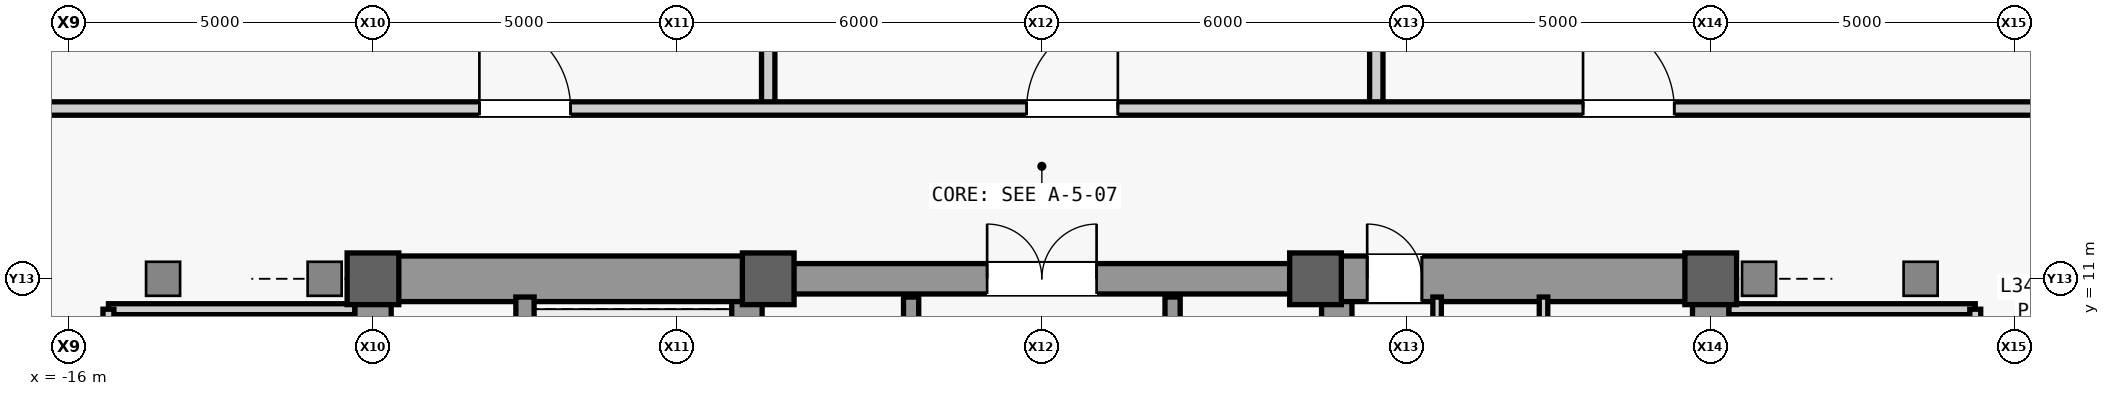
"""IFC4 building model, lengths in metres.
Left out: names, types, materials, properties, quantities, classifications, styles, units other than length and angle.
Written with IfcOpenShell. Run it as: python <this file> out.ifc"""

import sys

from ifc_helpers import new_model, si_unit, direction, frame, frame_2d, origin, origin_2d, place, context, subcontext, project, spatial, rectangle, extrude, source, transform, mapped, element, fill, save


model = new_model("IFC4")
c1 = context("Model", 3, precision=1e-05, world=origin(), true_north=direction((0.0, 1.0)))
c2 = subcontext(c1, "Body", "Model", "MODEL_VIEW")
j1 = project(units=[si_unit("LENGTHUNIT", "METRE"), si_unit("PLANEANGLEUNIT", "RADIAN")], contexts=[c1])
p1 = place(None, origin())
s1 = spatial("IfcSite", under=j1, at=p1, CompositionType="ELEMENT")
p2 = place(p1, origin())
s2 = spatial("IfcBuilding", under=s1, at=p2, CompositionType="ELEMENT")
p3 = place(p2, frame((0.0, 0.0, 149.9)))
s3 = spatial("IfcBuildingStorey", under=s2, at=p3, CompositionType="ELEMENT", Elevation=149.9)
m1 = source(origin(), c2, "Body", "SweptSolid", [
    extrude(rectangle(XDim=22.0, YDim=0.6, at=frame_2d((11.0, 0.0))), origin(), (0.0, 0.0, 1.0), 4.98),
])
p4 = place(p3, frame((-11.0, -11.0, 0.0), z_axis=(0.0, 0.0, 1.0), x_axis=(0.0, 1.0, 0.0)))
e1 = element("IfcWall", 1, at=p4, inside=s3, PredefinedType="SHEAR", context=c2, shape_type="MappedRepresentation", body=[
    mapped(m1, transform((0.0, 0.0, 0.0), scale=1.0)),
])
m2 = source(origin(), c2, "Body", "SweptSolid", [
    extrude(rectangle(XDim=1.1, YDim=2.2, at=frame_2d((0.55, 1.1))), frame((0.0, 0.31, 0.0), z_axis=(0.0, -1.0, 0.0), x_axis=(1.0, 0.0, 0.0)), (0.0, 0.0, 1.0), 0.62),
])
p5 = place(p4, frame((0.8, 0.0, 0.0)))
e2 = element("IfcOpeningElement", 2, at=p5, cuts=e1, PredefinedType="OPENING", context=c2, shape_type="MappedRepresentation", body=[
    mapped(m2, transform((0.0, 0.0, 0.0), scale=1.0)),
])
p6 = place(p4, frame((12.5, 0.0, 0.0)))
e3 = element("IfcOpeningElement", 3, at=p6, cuts=e1, PredefinedType="OPENING", context=c2, shape_type="MappedRepresentation", body=[
    mapped(m2, transform((0.0, 0.0, 0.0), scale=1.0)),
])
m3 = source(origin(), c2, "Body", "SweptSolid", [
    extrude(rectangle(XDim=0.9, YDim=2.15, at=frame_2d((0.45, 1.075))), frame((0.0, 0.31, 0.0), z_axis=(0.0, -1.0, 0.0), x_axis=(1.0, 0.0, 0.0)), (0.0, 0.0, 1.0), 0.62),
])
p7 = place(p4, frame((7.575, 0.0, 0.0)))
e4 = element("IfcOpeningElement", 4, at=p7, cuts=e1, PredefinedType="OPENING", context=c2, shape_type="MappedRepresentation", body=[
    mapped(m3, transform((0.0, 0.0, 0.0), scale=1.0)),
])
m4 = source(origin(), c2, "Body", "SweptSolid", [
    extrude(rectangle(XDim=1.3, YDim=2.3, at=frame_2d((0.65, 1.15))), frame((0.0, 0.31, 0.0), z_axis=(0.0, -1.0, 0.0), x_axis=(1.0, 0.0, 0.0)), (0.0, 0.0, 1.0), 0.62),
])
p8 = place(p4, frame((2.7, 0.0, 0.0)))
e5 = element("IfcOpeningElement", 5, at=p8, cuts=e1, PredefinedType="OPENING", context=c2, shape_type="MappedRepresentation", body=[
    mapped(m4, transform((0.0, 0.0, 0.0), scale=1.0)),
])
p9 = place(p3, frame((11.0, -11.0, 0.0), z_axis=(0.0, 0.0, 1.0), x_axis=(0.0, 1.0, 0.0)))
e6 = element("IfcWall", 6, at=p9, inside=s3, PredefinedType="SHEAR", context=c2, shape_type="MappedRepresentation", body=[
    mapped(m1, transform((0.0, 0.0, 0.0), scale=1.0)),
])
p10 = place(p9, frame((0.8, 0.0, 0.0)))
e7 = element("IfcOpeningElement", 7, at=p10, cuts=e6, PredefinedType="OPENING", context=c2, shape_type="MappedRepresentation", body=[
    mapped(m2, transform((0.0, 0.0, 0.0), scale=1.0)),
])
p11 = place(p9, frame((7.575, 0.0, 0.0)))
e8 = element("IfcOpeningElement", 8, at=p11, cuts=e6, PredefinedType="OPENING", context=c2, shape_type="MappedRepresentation", body=[
    mapped(m3, transform((0.0, 0.0, 0.0), scale=1.0)),
])
p12 = place(p9, frame((2.7, 0.0, 0.0)))
e9 = element("IfcOpeningElement", 9, at=p12, cuts=e6, PredefinedType="OPENING", context=c2, shape_type="MappedRepresentation", body=[
    mapped(m4, transform((0.0, 0.0, 0.0), scale=1.0)),
])
p13 = place(p9, frame((13.35, 0.0, 0.0)))
e10 = element("IfcOpeningElement", 10, at=p13, cuts=e6, PredefinedType="OPENING", context=c2, shape_type="MappedRepresentation", body=[
    mapped(m4, transform((0.0, 0.0, 0.0), scale=1.0)),
])
m5 = source(origin(), c2, "Body", "SweptSolid", [
    extrude(rectangle(XDim=21.4, YDim=0.5, at=frame_2d((10.7, 0.0))), origin(), (0.0, 0.0, 1.0), 4.98),
])
for number, where, z_axis, x_axis in (
    (11, (-4.85, -10.7, 0.0), (0.0, 0.0, 1.0), (0.0, 1.0, 0.0)),
    (12, (4.85, -10.7, 0.0), (0.0, 0.0, 1.0), (0.0, 1.0, 0.0)),
):
    element("IfcWall", number, at=place(p3, frame(where, z_axis=z_axis, x_axis=x_axis)), inside=s3, PredefinedType="SHEAR", context=c2, shape_type="MappedRepresentation", body=[
        mapped(m5, transform((0.0, 0.0, 0.0), scale=1.0)),
    ])
m6 = source(origin(), c2, "Body", "SweptSolid", [
    extrude(rectangle(XDim=5.85, YDim=0.75, at=frame_2d((2.925, 0.0))), origin(), (0.0, 0.0, 1.0), 4.98),
])
p14 = place(p3, frame((-10.7, 11.0, 0.0), z_axis=(0.0, 0.0, 1.0), x_axis=(1.0, 0.0, 0.0)))
e13 = element("IfcWall", 13, at=p14, inside=s3, PredefinedType="SHEAR", context=c2, shape_type="MappedRepresentation", body=[
    mapped(m6, transform((0.0, 0.0, 0.0), scale=1.0)),
])
p15 = place(p3, frame((4.85, 11.0, 0.0), z_axis=(0.0, 0.0, 1.0), x_axis=(1.0, 0.0, 0.0)))
e14 = element("IfcWall", 14, at=p15, inside=s3, PredefinedType="SHEAR", context=c2, shape_type="MappedRepresentation", body=[
    mapped(m6, transform((0.0, 0.0, 0.0), scale=1.0)),
])
m7 = source(origin(), c2, "Body", "SweptSolid", [
    extrude(rectangle(XDim=0.9, YDim=2.15, at=frame_2d((0.45, 1.075))), frame((0.0, 0.385, 0.0), z_axis=(0.0, -1.0, 0.0), x_axis=(1.0, 0.0, 0.0)), (0.0, 0.0, 1.0), 0.77),
])
p16 = place(p15, frame((0.5, 0.0, 0.0)))
e15 = element("IfcOpeningElement", 15, at=p16, cuts=e14, PredefinedType="OPENING", context=c2, shape_type="MappedRepresentation", body=[
    mapped(m7, transform((0.0, 0.0, 0.0), scale=1.0)),
])
m8 = source(origin(), c2, "Body", "SweptSolid", [
    extrude(rectangle(XDim=9.2, YDim=0.5, at=frame_2d((4.6, 0.0))), origin(), (0.0, 0.0, 1.0), 4.98),
])
p17 = place(p3, frame((-4.6, 11.0, 0.0), z_axis=(0.0, 0.0, 1.0), x_axis=(1.0, 0.0, 0.0)))
e16 = element("IfcWall", 16, at=p17, inside=s3, PredefinedType="SHEAR", context=c2, shape_type="MappedRepresentation", body=[
    mapped(m8, transform((0.0, 0.0, 0.0), scale=1.0)),
])
m9 = source(origin(), c2, "Body", "SweptSolid", [
    extrude(rectangle(XDim=1.8, YDim=2.25, at=frame_2d((0.9, 1.125))), frame((0.0, 0.26, 0.0), z_axis=(0.0, -1.0, 0.0), x_axis=(1.0, 0.0, 0.0)), (0.0, 0.0, 1.0), 0.52),
])
p18 = place(p17, frame((3.7, 0.0, 0.0)))
e17 = element("IfcOpeningElement", 17, at=p18, cuts=e16, PredefinedType="OPENING", context=c2, shape_type="MappedRepresentation", body=[
    mapped(m9, transform((0.0, 0.0, 0.0), scale=1.0)),
])
m10 = source(origin(), c2, "Body", "SweptSolid", [
    extrude(rectangle(XDim=0.85, YDim=0.85, at=origin_2d()), origin(), (0.0, 0.0, 1.0), 5.2),
])
for number, where, z_axis, x_axis in (
    (18, (-11.0, 11.0, 0.0), (0.0, 0.0, 1.0), (1.0, 0.0, 0.0)),
    (19, (-4.5, 11.0, 0.0), (0.0, 0.0, 1.0), (1.0, 0.0, 0.0)),
    (20, (4.5, 11.0, 0.0), (0.0, 0.0, 1.0), (1.0, 0.0, 0.0)),
    (21, (11.0, 11.0, 0.0), (0.0, 0.0, 1.0), (1.0, 0.0, 0.0)),
):
    element("IfcColumn", number, at=place(p3, frame(where, z_axis=z_axis, x_axis=x_axis)), inside=s3, PredefinedType="COLUMN", context=c2, shape_type="MappedRepresentation", body=[
        mapped(m10, transform((0.0, 0.0, 0.0), scale=1.0)),
    ])
m11 = source(origin(), c2, "Body", "SweptSolid", [
    extrude(rectangle(XDim=7.75, YDim=0.3, at=frame_2d((3.875, 0.0))), origin(), (0.0, 0.0, 1.0), 4.98),
])
p19 = place(p3, frame((-8.5, 2.95, 0.0), z_axis=(0.0, 0.0, 1.0), x_axis=(0.0, 1.0, 0.0)))
e22 = element("IfcWall", 22, at=p19, inside=s3, PredefinedType="SHEAR", context=c2, shape_type="MappedRepresentation", body=[
    mapped(m11, transform((0.0, 0.0, 0.0), scale=1.0)),
])
m12 = source(origin(), c2, "Body", "SweptSolid", [
    extrude(rectangle(XDim=9.4, YDim=0.14, at=frame_2d((4.7, 0.0))), origin(), (0.0, 0.0, 1.0), 4.98),
])
p20 = place(p3, frame((8.25, 1.3, 0.0), z_axis=(0.0, 0.0, 1.0), x_axis=(0.0, 1.0, 0.0)))
e23 = element("IfcWall", 23, at=p20, inside=s3, PredefinedType="PARTITIONING", context=c2, shape_type="MappedRepresentation", body=[
    mapped(m12, transform((0.0, 0.0, 0.0), scale=1.0)),
])
m13 = source(origin(), c2, "Body", "SweptSolid", [
    extrude(rectangle(XDim=5.7, YDim=0.14, at=frame_2d((2.85, 0.0))), origin(), (0.0, 0.0, 1.0), 4.98),
])
p21 = place(p3, frame((6.5, 5.0, 0.0), z_axis=(0.0, 0.0, 1.0), x_axis=(0.0, 1.0, 0.0)))
e24 = element("IfcWall", 24, at=p21, inside=s3, PredefinedType="PARTITIONING", context=c2, shape_type="MappedRepresentation", body=[
    mapped(m13, transform((0.0, 0.0, 0.0), scale=1.0)),
])
m14 = source(origin(), c2, "Body", "SweptSolid", [
    extrude(rectangle(XDim=0.9, YDim=2.15, at=frame_2d((0.45, 1.075))), frame((0.0, 0.08, 0.0), z_axis=(0.0, -1.0, 0.0), x_axis=(1.0, 0.0, 0.0)), (0.0, 0.0, 1.0), 0.16),
])
p22 = place(p21, frame((2.05, 0.0, 0.0)))
e25 = element("IfcOpeningElement", 25, at=p22, cuts=e24, PredefinedType="OPENING", context=c2, shape_type="MappedRepresentation", body=[
    mapped(m14, transform((0.0, 0.0, 0.0), scale=1.0)),
])
m15 = source(origin(), c2, "Body", "SweptSolid", [
    extrude(rectangle(XDim=4.05, YDim=0.18, at=frame_2d((2.025, 0.0))), origin(), (0.0, 0.0, 1.0), 4.98),
])
p23 = place(p3, frame((-15.35, 10.5, 0.0), z_axis=(0.0, 0.0, 1.0), x_axis=(1.0, 0.0, 0.0)))
e26 = element("IfcWall", 26, at=p23, inside=s3, PredefinedType="PARTITIONING", context=c2, shape_type="MappedRepresentation", body=[
    mapped(m15, transform((0.0, 0.0, 0.0), scale=1.0)),
])
m16 = source(origin(), c2, "Body", "SweptSolid", [
    extrude(rectangle(XDim=16.6, YDim=0.18, at=frame_2d((8.3, 0.0))), origin(), (0.0, 0.0, 1.0), 4.98),
])
p24 = place(p3, frame((-15.35, -6.1, 0.0), z_axis=(0.0, 0.0, 1.0), x_axis=(0.0, 1.0, 0.0)))
e27 = element("IfcWall", 27, at=p24, inside=s3, PredefinedType="PARTITIONING", context=c2, shape_type="MappedRepresentation", body=[
    mapped(m16, transform((0.0, 0.0, 0.0), scale=1.0)),
])
m17 = source(origin(), c2, "Body", "SweptSolid", [
    extrude(rectangle(XDim=1.8, YDim=2.25, at=frame_2d((0.9, 1.125))), frame((0.0, 0.1, 0.0), z_axis=(0.0, -1.0, 0.0), x_axis=(1.0, 0.0, 0.0)), (0.0, 0.0, 1.0), 0.2),
])
p25 = place(p24, frame((2.7, 0.0, 0.0)))
e28 = element("IfcOpeningElement", 28, at=p25, cuts=e27, PredefinedType="OPENING", context=c2, shape_type="MappedRepresentation", body=[
    mapped(m17, transform((0.0, 0.0, 0.0), scale=1.0)),
])
p26 = place(p24, frame((11.0, 0.0, 0.0)))
e29 = element("IfcOpeningElement", 29, at=p26, cuts=e27, PredefinedType="OPENING", context=c2, shape_type="MappedRepresentation", body=[
    mapped(m17, transform((0.0, 0.0, 0.0), scale=1.0)),
])
p27 = place(p3, frame((11.3, 10.5, 0.0), z_axis=(0.0, 0.0, 1.0), x_axis=(1.0, 0.0, 0.0)))
e30 = element("IfcWall", 30, at=p27, inside=s3, PredefinedType="PARTITIONING", context=c2, shape_type="MappedRepresentation", body=[
    mapped(m15, transform((0.0, 0.0, 0.0), scale=1.0)),
])
p28 = place(p3, frame((15.35, -6.1, 0.0), z_axis=(0.0, 0.0, 1.0), x_axis=(0.0, 1.0, 0.0)))
e31 = element("IfcWall", 31, at=p28, inside=s3, PredefinedType="PARTITIONING", context=c2, shape_type="MappedRepresentation", body=[
    mapped(m16, transform((0.0, 0.0, 0.0), scale=1.0)),
])
p29 = place(p28, frame((2.7, 0.0, 0.0)))
e32 = element("IfcOpeningElement", 32, at=p29, cuts=e31, PredefinedType="OPENING", context=c2, shape_type="MappedRepresentation", body=[
    mapped(m17, transform((0.0, 0.0, 0.0), scale=1.0)),
])
p30 = place(p28, frame((13.0, 0.0, 0.0)))
e33 = element("IfcOpeningElement", 33, at=p30, cuts=e31, PredefinedType="OPENING", context=c2, shape_type="MappedRepresentation", body=[
    mapped(m17, transform((0.0, 0.0, 0.0), scale=1.0)),
])
m18 = source(origin(), c2, "Body", "SweptSolid", [
    extrude(rectangle(XDim=5.4, YDim=0.25, at=frame_2d((2.7, 0.0))), origin(), (0.0, 0.0, 1.0), 4.98),
])
for number, where, z_axis, x_axis in (
    (34, (-2.15, 5.3, 0.0), (0.0, 0.0, 1.0), (0.0, 1.0, 0.0)),
    (35, (2.15, 5.3, 0.0), (0.0, 0.0, 1.0), (0.0, 1.0, 0.0)),
):
    element("IfcWall", number, at=place(p3, frame(where, z_axis=z_axis, x_axis=x_axis)), inside=s3, PredefinedType="SHEAR", context=c2, shape_type="MappedRepresentation", body=[
        mapped(m18, transform((0.0, 0.0, 0.0), scale=1.0)),
    ])
m19 = source(origin(), c2, "Body", "SweptSolid", [
    extrude(rectangle(XDim=16.2, YDim=0.22, at=frame_2d((8.1, 0.0))), origin(), (0.0, 0.0, 1.0), 4.98),
])
for number, where, z_axis, x_axis in (
    (36, (-4.5, 13.8, 0.0), (0.0, 0.0, 1.0), (0.0, 1.0, 0.0)),
    (37, (5.5, 13.8, 0.0), (0.0, 0.0, 1.0), (0.0, 1.0, 0.0)),
):
    element("IfcWall", number, at=place(p3, frame(where, z_axis=z_axis, x_axis=x_axis)), inside=s3, PredefinedType="PARTITIONING", context=c2, shape_type="MappedRepresentation", body=[
        mapped(m19, transform((0.0, 0.0, 0.0), scale=1.0)),
    ])
m20 = source(origin(), c2, "Body", "SweptSolid", [
    extrude(rectangle(XDim=51.0, YDim=0.22, at=frame_2d((25.5, 0.0))), origin(), (0.0, 0.0, 1.0), 4.98),
])
p31 = place(p3, frame((-25.5, 13.8, 0.0), z_axis=(0.0, 0.0, 1.0), x_axis=(1.0, 0.0, 0.0)))
e38 = element("IfcWall", 38, at=p31, inside=s3, PredefinedType="PARTITIONING", context=c2, shape_type="MappedRepresentation", body=[
    mapped(m20, transform((0.0, 0.0, 0.0), scale=1.0)),
])
m21 = source(origin(), c2, "Body", "SweptSolid", [
    extrude(rectangle(XDim=1.5, YDim=2.3, at=frame_2d((0.75, 1.15))), frame((0.0, 0.12, 0.0), z_axis=(0.0, -1.0, 0.0), x_axis=(1.0, 0.0, 0.0)), (0.0, 0.0, 1.0), 0.24),
])
p32 = place(p31, frame((16.25, 0.0, 0.0)))
e39 = element("IfcOpeningElement", 39, at=p32, cuts=e38, PredefinedType="OPENING", context=c2, shape_type="MappedRepresentation", body=[
    mapped(m21, transform((0.0, 0.0, 0.0), scale=1.0)),
])
p33 = place(p31, frame((25.25, 0.0, 0.0)))
e40 = element("IfcOpeningElement", 40, at=p33, cuts=e38, PredefinedType="OPENING", context=c2, shape_type="MappedRepresentation", body=[
    mapped(m21, transform((0.0, 0.0, 0.0), scale=1.0)),
])
p34 = place(p31, frame((34.4, 0.0, 0.0)))
e41 = element("IfcOpeningElement", 41, at=p34, cuts=e38, PredefinedType="OPENING", context=c2, shape_type="MappedRepresentation", body=[
    mapped(m21, transform((0.0, 0.0, 0.0), scale=1.0)),
])
m22 = source(origin(), c2, "Body", "SweptSolid", [
    extrude(rectangle(XDim=0.9, YDim=2.15, at=frame_2d((0.45, 1.075))), frame((0.0, 0.025, 0.0), z_axis=(0.0, -1.0, 0.0), x_axis=(1.0, 0.0, 0.0)), (0.0, 0.0, 1.0), 0.05),
])
p35 = place(p16, origin())
e42 = element("IfcDoor", 42, at=p35, inside=s3, OperationType="SINGLE_SWING_LEFT", PredefinedType="DOOR", context=c2, shape_type="MappedRepresentation", body=[
    mapped(m22, transform((0.0, 0.0, 0.0), scale=1.0)),
])
fill(e15, e42)
m23 = source(origin(), c2, "Body", "SweptSolid", [
    extrude(rectangle(XDim=1.8, YDim=2.25, at=frame_2d((0.9, 1.125))), frame((0.0, 0.025, 0.0), z_axis=(0.0, -1.0, 0.0), x_axis=(1.0, 0.0, 0.0)), (0.0, 0.0, 1.0), 0.05),
])
p36 = place(p18, origin())
e43 = element("IfcDoor", 43, at=p36, inside=s3, OperationType="SINGLE_SWING_RIGHT", PredefinedType="DOOR", context=c2, shape_type="MappedRepresentation", body=[
    mapped(m23, transform((0.0, 0.0, 0.0), scale=1.0)),
])
fill(e17, e43)
m24 = source(origin(), c2, "Body", "SweptSolid", [
    extrude(rectangle(XDim=1.5, YDim=2.3, at=frame_2d((0.75, 1.15))), frame((0.0, 0.025, 0.0), z_axis=(0.0, -1.0, 0.0), x_axis=(1.0, 0.0, 0.0)), (0.0, 0.0, 1.0), 0.05),
])
p37 = place(p32, origin())
e44 = element("IfcDoor", 44, at=p37, inside=s3, OperationType="SINGLE_SWING_LEFT", PredefinedType="DOOR", context=c2, shape_type="MappedRepresentation", body=[
    mapped(m24, transform((0.0, 0.0, 0.0), scale=1.0)),
])
fill(e39, e44)
p38 = place(p33, origin())
e45 = element("IfcDoor", 45, at=p38, inside=s3, OperationType="SINGLE_SWING_RIGHT", PredefinedType="DOOR", context=c2, shape_type="MappedRepresentation", body=[
    mapped(m24, transform((0.0, 0.0, 0.0), scale=1.0)),
])
fill(e40, e45)
p39 = place(p34, origin())
e46 = element("IfcDoor", 46, at=p39, inside=s3, OperationType="SINGLE_SWING_LEFT", PredefinedType="DOOR", context=c2, shape_type="MappedRepresentation", body=[
    mapped(m24, transform((0.0, 0.0, 0.0), scale=1.0)),
])
fill(e41, e46)
save(model, sys.argv[1])
